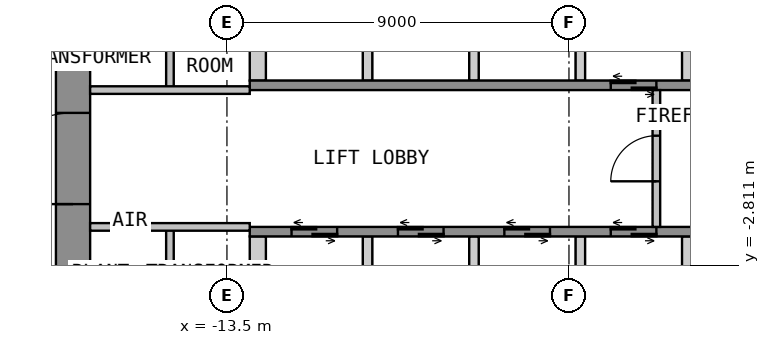
"""IFC4 building model, lengths in metres.
Left out: names, types, materials, properties, quantities, classifications, styles, units other than length and angle.
Written with IfcOpenShell. Run it as: python <this file> out.ifc"""

import sys

from ifc_helpers import new_model, si_unit, direction, frame, frame_2d, origin, place, context, subcontext, project, spatial, polyline, rectangle, outline, extrude, element, fill, save


model = new_model("IFC4")
c1 = context("Model", 3, precision=1e-05, world=origin(), true_north=direction((0.0, 1.0)))
c2 = subcontext(c1, "Body", "Model", "MODEL_VIEW")
j1 = project(units=[si_unit("LENGTHUNIT", "METRE"), si_unit("PLANEANGLEUNIT", "RADIAN")], contexts=[c1])
p1 = place(None, origin())
s1 = spatial("IfcSite", under=j1, at=p1, CompositionType="ELEMENT")
p2 = place(p1, origin())
s2 = spatial("IfcBuilding", under=s1, at=p2, CompositionType="ELEMENT")
p3 = place(p2, frame((0.0, 0.0, 76.8)))
s3 = spatial("IfcBuildingStorey", under=s2, at=p3, CompositionType="ELEMENT", Elevation=76.8)
p4 = place(p3, frame((-17.55, -12.6, 0.0), z_axis=(0.0, 0.0, 1.0), x_axis=(0.0, 1.0, 0.0)))
e1 = element("IfcWall", 1, at=p4, inside=s3, PredefinedType="SHEAR", context=c2, shape_type="SweptSolid", body=[
    extrude(rectangle(XDim=25.2, YDim=0.9, at=frame_2d((12.6, 0.0))), origin(), (0.0, 0.0, 1.0), 4.125),
])
p5 = place(p4, frame((11.4, 0.0, 0.0)))
e2 = element("IfcOpeningElement", 2, at=p5, cuts=e1, PredefinedType="OPENING", context=c2, shape_type="SweptSolid", body=[
    extrude(rectangle(XDim=2.4, YDim=2.1, at=frame_2d((1.2, 1.05))), frame((0.0, 0.46, 0.0), z_axis=(0.0, -1.0, 0.0), x_axis=(1.0, 0.0, 0.0)), (0.0, 0.0, 1.0), 0.92),
])
p6 = place(p3, origin())
e3 = element("IfcWall", 3, at=p6, inside=s3, PredefinedType="SHEAR", context=c2, shape_type="SweptSolid", body=[
    extrude(outline(polyline([(-12.9, 2.05), (-12.475, 2.05), (-12.475, 4.75), (-12.9, 4.75), (-12.9, 2.05)])), origin(), (0.0, 0.0, 1.0), 4.125),
])
p7 = place(p3, origin())
e4 = element("IfcWall", 4, at=p7, inside=s3, PredefinedType="SHEAR", context=c2, shape_type="SweptSolid", body=[
    extrude(outline(polyline([(-9.925, 2.05), (-9.675, 2.05), (-9.675, 4.75), (-9.925, 4.75), (-9.925, 2.05)])), origin(), (0.0, 0.0, 1.0), 4.125),
])
p8 = place(p3, origin())
e5 = element("IfcWall", 5, at=p8, inside=s3, PredefinedType="SHEAR", context=c2, shape_type="SweptSolid", body=[
    extrude(outline(polyline([(-7.125, 2.05), (-6.875, 2.05), (-6.875, 4.75), (-7.125, 4.75), (-7.125, 2.05)])), origin(), (0.0, 0.0, 1.0), 4.125),
])
p9 = place(p3, origin())
e6 = element("IfcWall", 6, at=p9, inside=s3, PredefinedType="SHEAR", context=c2, shape_type="SweptSolid", body=[
    extrude(outline(polyline([(-4.325, 2.05), (-4.075, 2.05), (-4.075, 4.75), (-4.325, 4.75), (-4.325, 2.05)])), origin(), (0.0, 0.0, 1.0), 4.125),
])
p10 = place(p3, origin())
e7 = element("IfcWall", 7, at=p10, inside=s3, PredefinedType="SHEAR", context=c2, shape_type="SweptSolid", body=[
    extrude(outline(polyline([(-1.525, 2.05), (-1.275, 2.05), (-1.275, 4.75), (-1.525, 4.75), (-1.525, 2.05)])), origin(), (0.0, 0.0, 1.0), 4.125),
])
p11 = place(p3, frame((-12.9, 1.925, 0.0), z_axis=(0.0, 0.0, 1.0), x_axis=(1.0, 0.0, 0.0)))
e8 = element("IfcWall", 8, at=p11, inside=s3, PredefinedType="SHEAR", context=c2, shape_type="SweptSolid", body=[
    extrude(rectangle(XDim=25.8, YDim=0.25, at=frame_2d((12.9, 0.0))), origin(), (0.0, 0.0, 1.0), 4.125),
])
p12 = place(p11, frame((9.5, 0.0, 0.0)))
e9 = element("IfcOpeningElement", 9, at=p12, cuts=e8, PredefinedType="OPENING", context=c2, shape_type="SweptSolid", body=[
    extrude(rectangle(XDim=1.2, YDim=2.1, at=frame_2d((0.6, 1.05))), frame((0.0, 0.135, 0.0), z_axis=(0.0, -1.0, 0.0), x_axis=(1.0, 0.0, 0.0)), (0.0, 0.0, 1.0), 0.27),
])
p13 = place(p11, frame((12.3, 0.0, 0.0)))
e10 = element("IfcOpeningElement", 10, at=p13, cuts=e8, PredefinedType="OPENING", context=c2, shape_type="SweptSolid", body=[
    extrude(rectangle(XDim=1.2, YDim=2.1, at=frame_2d((0.6, 1.05))), frame((0.0, 0.135, 0.0), z_axis=(0.0, -1.0, 0.0), x_axis=(1.0, 0.0, 0.0)), (0.0, 0.0, 1.0), 0.27),
])
p14 = place(p11, frame((15.1, 0.0, 0.0)))
e11 = element("IfcOpeningElement", 11, at=p14, cuts=e8, PredefinedType="OPENING", context=c2, shape_type="SweptSolid", body=[
    extrude(rectangle(XDim=1.2, YDim=2.1, at=frame_2d((0.6, 1.05))), frame((0.0, 0.135, 0.0), z_axis=(0.0, -1.0, 0.0), x_axis=(1.0, 0.0, 0.0)), (0.0, 0.0, 1.0), 0.27),
])
p15 = place(p11, frame((17.9, 0.0, 0.0)))
e12 = element("IfcOpeningElement", 12, at=p15, cuts=e8, PredefinedType="OPENING", context=c2, shape_type="SweptSolid", body=[
    extrude(rectangle(XDim=1.2, YDim=2.1, at=frame_2d((0.6, 1.05))), frame((0.0, 0.135, 0.0), z_axis=(0.0, -1.0, 0.0), x_axis=(1.0, 0.0, 0.0)), (0.0, 0.0, 1.0), 0.27),
])
p16 = place(p11, frame((20.7, 0.0, 0.0)))
e13 = element("IfcOpeningElement", 13, at=p16, cuts=e8, PredefinedType="OPENING", context=c2, shape_type="SweptSolid", body=[
    extrude(rectangle(XDim=1.2, YDim=2.1, at=frame_2d((0.6, 1.05))), frame((0.0, 0.135, 0.0), z_axis=(0.0, -1.0, 0.0), x_axis=(1.0, 0.0, 0.0)), (0.0, 0.0, 1.0), 0.27),
])
p17 = place(p11, frame((23.5, 0.0, 0.0)))
e14 = element("IfcOpeningElement", 14, at=p17, cuts=e8, PredefinedType="OPENING", context=c2, shape_type="SweptSolid", body=[
    extrude(rectangle(XDim=1.2, YDim=2.1, at=frame_2d((0.6, 1.05))), frame((0.0, 0.135, 0.0), z_axis=(0.0, -1.0, 0.0), x_axis=(1.0, 0.0, 0.0)), (0.0, 0.0, 1.0), 0.27),
])
p18 = place(p3, origin())
e15 = element("IfcWall", 15, at=p18, inside=s3, PredefinedType="SHEAR", context=c2, shape_type="SweptSolid", body=[
    extrude(outline(polyline([(-12.9, -4.75), (-12.475, -4.75), (-12.475, -2.05), (-12.9, -2.05), (-12.9, -4.75)])), origin(), (0.0, 0.0, 1.0), 4.125),
])
p19 = place(p3, origin())
e16 = element("IfcWall", 16, at=p19, inside=s3, PredefinedType="SHEAR", context=c2, shape_type="SweptSolid", body=[
    extrude(outline(polyline([(-9.925, -4.75), (-9.675, -4.75), (-9.675, -2.05), (-9.925, -2.05), (-9.925, -4.75)])), origin(), (0.0, 0.0, 1.0), 4.125),
])
p20 = place(p3, origin())
e17 = element("IfcWall", 17, at=p20, inside=s3, PredefinedType="SHEAR", context=c2, shape_type="SweptSolid", body=[
    extrude(outline(polyline([(-7.125, -4.75), (-6.875, -4.75), (-6.875, -2.05), (-7.125, -2.05), (-7.125, -4.75)])), origin(), (0.0, 0.0, 1.0), 4.125),
])
p21 = place(p3, origin())
e18 = element("IfcWall", 18, at=p21, inside=s3, PredefinedType="SHEAR", context=c2, shape_type="SweptSolid", body=[
    extrude(outline(polyline([(-4.325, -4.75), (-4.075, -4.75), (-4.075, -2.05), (-4.325, -2.05), (-4.325, -4.75)])), origin(), (0.0, 0.0, 1.0), 4.125),
])
p22 = place(p3, origin())
e19 = element("IfcWall", 19, at=p22, inside=s3, PredefinedType="SHEAR", context=c2, shape_type="SweptSolid", body=[
    extrude(outline(polyline([(-1.525, -4.75), (-1.275, -4.75), (-1.275, -2.05), (-1.525, -2.05), (-1.525, -4.75)])), origin(), (0.0, 0.0, 1.0), 4.125),
])
p23 = place(p3, frame((-12.9, -1.925, 0.0), z_axis=(0.0, 0.0, 1.0), x_axis=(1.0, 0.0, 0.0)))
e20 = element("IfcWall", 20, at=p23, inside=s3, PredefinedType="SHEAR", context=c2, shape_type="SweptSolid", body=[
    extrude(rectangle(XDim=25.8, YDim=0.25, at=frame_2d((12.9, 0.0))), origin(), (0.0, 0.0, 1.0), 4.125),
])
p24 = place(p23, frame((1.1, 0.0, 0.0)))
e21 = element("IfcOpeningElement", 21, at=p24, cuts=e20, PredefinedType="OPENING", context=c2, shape_type="SweptSolid", body=[
    extrude(rectangle(XDim=1.2, YDim=2.1, at=frame_2d((0.6, 1.05))), frame((0.0, 0.135, 0.0), z_axis=(0.0, -1.0, 0.0), x_axis=(1.0, 0.0, 0.0)), (0.0, 0.0, 1.0), 0.27),
])
p25 = place(p23, frame((3.9, 0.0, 0.0)))
e22 = element("IfcOpeningElement", 22, at=p25, cuts=e20, PredefinedType="OPENING", context=c2, shape_type="SweptSolid", body=[
    extrude(rectangle(XDim=1.2, YDim=2.1, at=frame_2d((0.6, 1.05))), frame((0.0, 0.135, 0.0), z_axis=(0.0, -1.0, 0.0), x_axis=(1.0, 0.0, 0.0)), (0.0, 0.0, 1.0), 0.27),
])
p26 = place(p23, frame((6.7, 0.0, 0.0)))
e23 = element("IfcOpeningElement", 23, at=p26, cuts=e20, PredefinedType="OPENING", context=c2, shape_type="SweptSolid", body=[
    extrude(rectangle(XDim=1.2, YDim=2.1, at=frame_2d((0.6, 1.05))), frame((0.0, 0.135, 0.0), z_axis=(0.0, -1.0, 0.0), x_axis=(1.0, 0.0, 0.0)), (0.0, 0.0, 1.0), 0.27),
])
p27 = place(p23, frame((9.5, 0.0, 0.0)))
e24 = element("IfcOpeningElement", 24, at=p27, cuts=e20, PredefinedType="OPENING", context=c2, shape_type="SweptSolid", body=[
    extrude(rectangle(XDim=1.2, YDim=2.1, at=frame_2d((0.6, 1.05))), frame((0.0, 0.135, 0.0), z_axis=(0.0, -1.0, 0.0), x_axis=(1.0, 0.0, 0.0)), (0.0, 0.0, 1.0), 0.27),
])
p28 = place(p23, frame((12.3, 0.0, 0.0)))
e25 = element("IfcOpeningElement", 25, at=p28, cuts=e20, PredefinedType="OPENING", context=c2, shape_type="SweptSolid", body=[
    extrude(rectangle(XDim=1.2, YDim=2.1, at=frame_2d((0.6, 1.05))), frame((0.0, 0.135, 0.0), z_axis=(0.0, -1.0, 0.0), x_axis=(1.0, 0.0, 0.0)), (0.0, 0.0, 1.0), 0.27),
])
p29 = place(p23, frame((15.1, 0.0, 0.0)))
e26 = element("IfcOpeningElement", 26, at=p29, cuts=e20, PredefinedType="OPENING", context=c2, shape_type="SweptSolid", body=[
    extrude(rectangle(XDim=1.2, YDim=2.1, at=frame_2d((0.6, 1.05))), frame((0.0, 0.135, 0.0), z_axis=(0.0, -1.0, 0.0), x_axis=(1.0, 0.0, 0.0)), (0.0, 0.0, 1.0), 0.27),
])
p30 = place(p3, frame((-2.2, -1.8, 0.0), z_axis=(0.0, 0.0, 1.0), x_axis=(0.0, 1.0, 0.0)))
e27 = element("IfcWall", 27, at=p30, inside=s3, PredefinedType="PARTITIONING", context=c2, shape_type="SweptSolid", body=[
    extrude(rectangle(XDim=3.6, YDim=0.2, at=frame_2d((1.8, 0.0))), origin(), (0.0, 0.0, 1.0), 4.125),
])
p31 = place(p30, frame((1.2, 0.0, 0.0)))
e28 = element("IfcOpeningElement", 28, at=p31, cuts=e27, PredefinedType="OPENING", context=c2, shape_type="SweptSolid", body=[
    extrude(rectangle(XDim=1.2, YDim=2.1, at=frame_2d((0.6, 1.05))), frame((0.0, 0.11, 0.0), z_axis=(0.0, -1.0, 0.0), x_axis=(1.0, 0.0, 0.0)), (0.0, 0.0, 1.0), 0.22),
])
p32 = place(p3, frame((-15.0, 1.8, 0.0), z_axis=(0.0, 0.0, 1.0), x_axis=(0.0, 1.0, 0.0)))
e29 = element("IfcWall", 29, at=p32, inside=s3, PredefinedType="PARTITIONING", context=c2, shape_type="SweptSolid", body=[
    extrude(rectangle(XDim=3.2, YDim=0.2, at=frame_2d((1.6, 0.0))), origin(), (0.0, 0.0, 1.0), 4.125),
])
p33 = place(p3, frame((-17.1, 1.8, 0.0), z_axis=(0.0, 0.0, 1.0), x_axis=(1.0, 0.0, 0.0)))
e30 = element("IfcWall", 30, at=p33, inside=s3, PredefinedType="PARTITIONING", context=c2, shape_type="SweptSolid", body=[
    extrude(rectangle(XDim=4.2, YDim=0.2, at=frame_2d((2.1, 0.0))), origin(), (0.0, 0.0, 1.0), 4.125),
])
p34 = place(p3, frame((-15.0, -5.0, 0.0), z_axis=(0.0, 0.0, 1.0), x_axis=(0.0, 1.0, 0.0)))
e31 = element("IfcWall", 31, at=p34, inside=s3, PredefinedType="PARTITIONING", context=c2, shape_type="SweptSolid", body=[
    extrude(rectangle(XDim=3.2, YDim=0.2, at=frame_2d((1.6, 0.0))), origin(), (0.0, 0.0, 1.0), 4.125),
])
p35 = place(p3, frame((-17.1, -1.8, 0.0), z_axis=(0.0, 0.0, 1.0), x_axis=(1.0, 0.0, 0.0)))
e32 = element("IfcWall", 32, at=p35, inside=s3, PredefinedType="PARTITIONING", context=c2, shape_type="SweptSolid", body=[
    extrude(rectangle(XDim=4.2, YDim=0.2, at=frame_2d((2.1, 0.0))), origin(), (0.0, 0.0, 1.0), 4.125),
])
p36 = place(p5, origin())
e33 = element("IfcDoor", 33, at=p36, inside=s3, OperationType="DOUBLE_DOOR_DOUBLE_SWING", PredefinedType="DOOR", context=c2, shape_type="SweptSolid", body=[
    extrude(rectangle(XDim=2.4, YDim=2.1, at=frame_2d((1.2, 1.05))), frame((0.0, 0.025, 0.0), z_axis=(0.0, -1.0, 0.0), x_axis=(1.0, 0.0, 0.0)), (0.0, 0.0, 1.0), 0.05),
])
fill(e2, e33)
p37 = place(p12, origin())
e34 = element("IfcDoor", 34, at=p37, inside=s3, OperationType="DOUBLE_DOOR_SLIDING", PredefinedType="DOOR", context=c2, shape_type="SweptSolid", body=[
    extrude(rectangle(XDim=1.2, YDim=2.1, at=frame_2d((0.6, 1.05))), frame((0.0, 0.025, 0.0), z_axis=(0.0, -1.0, 0.0), x_axis=(1.0, 0.0, 0.0)), (0.0, 0.0, 1.0), 0.05),
])
fill(e9, e34)
p38 = place(p24, origin())
e35 = element("IfcDoor", 35, at=p38, inside=s3, OperationType="DOUBLE_DOOR_SLIDING", PredefinedType="DOOR", context=c2, shape_type="SweptSolid", body=[
    extrude(rectangle(XDim=1.2, YDim=2.1, at=frame_2d((0.6, 1.05))), frame((0.0, 0.025, 0.0), z_axis=(0.0, -1.0, 0.0), x_axis=(1.0, 0.0, 0.0)), (0.0, 0.0, 1.0), 0.05),
])
fill(e21, e35)
p39 = place(p25, origin())
e36 = element("IfcDoor", 36, at=p39, inside=s3, OperationType="DOUBLE_DOOR_SLIDING", PredefinedType="DOOR", context=c2, shape_type="SweptSolid", body=[
    extrude(rectangle(XDim=1.2, YDim=2.1, at=frame_2d((0.6, 1.05))), frame((0.0, 0.025, 0.0), z_axis=(0.0, -1.0, 0.0), x_axis=(1.0, 0.0, 0.0)), (0.0, 0.0, 1.0), 0.05),
])
fill(e22, e36)
p40 = place(p26, origin())
e37 = element("IfcDoor", 37, at=p40, inside=s3, OperationType="DOUBLE_DOOR_SLIDING", PredefinedType="DOOR", context=c2, shape_type="SweptSolid", body=[
    extrude(rectangle(XDim=1.2, YDim=2.1, at=frame_2d((0.6, 1.05))), frame((0.0, 0.025, 0.0), z_axis=(0.0, -1.0, 0.0), x_axis=(1.0, 0.0, 0.0)), (0.0, 0.0, 1.0), 0.05),
])
fill(e23, e37)
p41 = place(p27, origin())
e38 = element("IfcDoor", 38, at=p41, inside=s3, OperationType="DOUBLE_DOOR_SLIDING", PredefinedType="DOOR", context=c2, shape_type="SweptSolid", body=[
    extrude(rectangle(XDim=1.2, YDim=2.1, at=frame_2d((0.6, 1.05))), frame((0.0, 0.025, 0.0), z_axis=(0.0, -1.0, 0.0), x_axis=(1.0, 0.0, 0.0)), (0.0, 0.0, 1.0), 0.05),
])
fill(e24, e38)
p42 = place(p31, origin())
e39 = element("IfcDoor", 39, at=p42, inside=s3, OperationType="SINGLE_SWING_LEFT", PredefinedType="DOOR", context=c2, shape_type="SweptSolid", body=[
    extrude(rectangle(XDim=1.2, YDim=2.1, at=frame_2d((0.6, 1.05))), frame((0.0, 0.025, 0.0), z_axis=(0.0, -1.0, 0.0), x_axis=(1.0, 0.0, 0.0)), (0.0, 0.0, 1.0), 0.05),
])
fill(e28, e39)
save(model, sys.argv[1])
